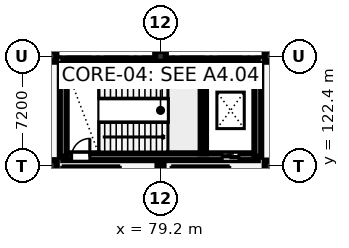
"""IFC4 building model, lengths in metres.
Left out: names, types, materials, properties, quantities, classifications, styles, units other than length and angle.
Written with IfcOpenShell. Run it as: python <this file> out.ifc"""

import sys

from ifc_helpers import new_model, si_unit, direction, frame, frame_2d, origin, origin_2d, place, context, subcontext, project, spatial, rectangle, hollow_rectangle, extrude, element, fill, save


model = new_model("IFC4")
c1 = context("Model", 3, precision=1e-05, world=origin(), true_north=direction((0.0, 1.0)))
c2 = subcontext(c1, "Body", "Model", "MODEL_VIEW")
j1 = project(units=[si_unit("LENGTHUNIT", "METRE"), si_unit("PLANEANGLEUNIT", "RADIAN")], contexts=[c1])
p1 = place(None, origin())
s1 = spatial("IfcSite", under=j1, at=p1, CompositionType="ELEMENT")
p2 = place(p1, origin())
s2 = spatial("IfcBuilding", under=s1, at=p2, CompositionType="ELEMENT")
p3 = place(p2, frame((0.0, 0.0, 9.6)))
s3 = spatial("IfcBuildingStorey", under=s2, at=p3, CompositionType="ELEMENT", Elevation=9.6)
p4 = place(p3, frame((72.0, 122.4, 0.0), z_axis=(0.0, 0.0, 1.0), x_axis=(1.0, 0.0, 0.0)))
e1 = element("IfcColumn", 1, at=p4, inside=s3, PredefinedType="COLUMN", context=c2, shape_type="SweptSolid", body=[
    extrude(rectangle(XDim=0.75, YDim=0.75, at=origin_2d()), origin(), (0.0, 0.0, 1.0), 4.2),
])
p5 = place(p3, frame((72.0, 129.6, 0.0), z_axis=(0.0, 0.0, 1.0), x_axis=(1.0, 0.0, 0.0)))
e2 = element("IfcColumn", 2, at=p5, inside=s3, PredefinedType="COLUMN", context=c2, shape_type="SweptSolid", body=[
    extrude(rectangle(XDim=0.7, YDim=0.7, at=origin_2d()), origin(), (0.0, 0.0, 1.0), 4.2),
])
p6 = place(p3, frame((79.2, 122.4, 0.0), z_axis=(0.0, 0.0, 1.0), x_axis=(1.0, 0.0, 0.0)))
e3 = element("IfcColumn", 3, at=p6, inside=s3, PredefinedType="COLUMN", context=c2, shape_type="SweptSolid", body=[
    extrude(hollow_rectangle(XDim=0.4, YDim=0.4, WallThickness=0.02, at=origin_2d()), origin(), (0.0, 0.0, 1.0), 4.2),
])
for number, where, z_axis, x_axis in (
    (4, (79.2, 129.6, 0.0), (0.0, 0.0, 1.0), (1.0, 0.0, 0.0)),
    (5, (86.4, 122.4, 0.0), (0.0, 0.0, 1.0), (1.0, 0.0, 0.0)),
    (6, (86.4, 129.6, 0.0), (0.0, 0.0, 1.0), (1.0, 0.0, 0.0)),
):
    element("IfcColumn", number, at=place(p3, frame(where, z_axis=z_axis, x_axis=x_axis)), inside=s3, PredefinedType="COLUMN", context=c2, shape_type="SweptSolid", body=[
        extrude(rectangle(XDim=0.7, YDim=0.7, at=origin_2d()), origin(), (0.0, 0.0, 1.0), 4.2),
    ])
p7 = place(p3, frame((72.8, 123.0, 0.0), z_axis=(0.0, 0.0, 1.0), x_axis=(1.0, 0.0, 0.0)))
e7 = element("IfcWall", 7, at=p7, inside=s3, PredefinedType="SHEAR", context=c2, shape_type="SweptSolid", body=[
    extrude(rectangle(XDim=12.8, YDim=0.45, at=frame_2d((6.4, 0.0))), origin(), (0.0, 0.0, 1.0), 3.88),
])
p8 = place(p7, frame((0.55, 0.0, 0.0)))
e8 = element("IfcOpeningElement", 8, at=p8, cuts=e7, PredefinedType="OPENING", context=c2, shape_type="SweptSolid", body=[
    extrude(rectangle(XDim=1.2, YDim=2.25, at=frame_2d((0.6, 1.125))), frame((0.0, 0.235, 0.0), z_axis=(0.0, -1.0, 0.0), x_axis=(1.0, 0.0, 0.0)), (0.0, 0.0, 1.0), 0.47),
])
p9 = place(p7, frame((10.458, 0.0, 0.0)))
e9 = element("IfcOpeningElement", 9, at=p9, cuts=e7, PredefinedType="OPENING", context=c2, shape_type="SweptSolid", body=[
    extrude(rectangle(XDim=1.1, YDim=2.2, at=frame_2d((0.55, 1.1))), frame((0.0, 0.235, 0.0), z_axis=(0.0, -1.0, 0.0), x_axis=(1.0, 0.0, 0.0)), (0.0, 0.0, 1.0), 0.47),
])
p10 = place(p3, frame((72.8, 129.1, 0.0), z_axis=(0.0, 0.0, 1.0), x_axis=(1.0, 0.0, 0.0)))
e10 = element("IfcWall", 10, at=p10, inside=s3, PredefinedType="SHEAR", context=c2, shape_type="SweptSolid", body=[
    extrude(rectangle(XDim=12.8, YDim=0.45, at=frame_2d((6.4, 0.0))), origin(), (0.0, 0.0, 1.0), 3.88),
])
for number, where, z_axis, x_axis in (
    (11, (72.8, 123.0, 0.0), (0.0, 0.0, 1.0), (0.0, 1.0, 0.0)),
    (12, (85.6, 123.0, 0.0), (0.0, 0.0, 1.0), (0.0, 1.0, 0.0)),
):
    element("IfcWall", number, at=place(p3, frame(where, z_axis=z_axis, x_axis=x_axis)), inside=s3, PredefinedType="SHEAR", context=c2, shape_type="SweptSolid", body=[
        extrude(rectangle(XDim=6.1, YDim=0.45, at=frame_2d((3.05, 0.0))), origin(), (0.0, 0.0, 1.0), 3.88),
    ])
p11 = place(p3, frame((82.016, 123.225, 0.0), z_axis=(0.0, 0.0, 1.0), x_axis=(0.0, 1.0, 0.0)))
e13 = element("IfcWall", 13, at=p11, inside=s3, PredefinedType="SHEAR", context=c2, shape_type="SweptSolid", body=[
    extrude(rectangle(XDim=5.65, YDim=0.35, at=frame_2d((2.825, 0.0))), origin(), (0.0, 0.0, 1.0), 3.88),
])
p12 = place(p3, frame((76.35, 122.2, 0.0), z_axis=(0.0, 0.0, 1.0), x_axis=(-1.0, 0.0, 0.0)))
e14 = element("IfcWall", 14, at=p12, inside=s3, PredefinedType="PARTITIONING", context=c2, shape_type="SweptSolid", body=[
    extrude(rectangle(XDim=3.45, YDim=0.2, at=frame_2d((1.725, 0.0))), origin(), (0.0, 0.0, 1.0), 2.94),
])
p13 = place(p3, frame((83.55, 122.2, 0.0), z_axis=(0.0, 0.0, 1.0), x_axis=(-1.0, 0.0, 0.0)))
e15 = element("IfcWall", 15, at=p13, inside=s3, PredefinedType="PARTITIONING", context=c2, shape_type="SweptSolid", body=[
    extrude(rectangle(XDim=3.45, YDim=0.2, at=frame_2d((1.725, 0.0))), origin(), (0.0, 0.0, 1.0), 2.94),
])
p14 = place(p8, origin())
e16 = element("IfcDoor", 16, at=p14, inside=s3, OperationType="SINGLE_SWING_RIGHT", PredefinedType="DOOR", context=c2, shape_type="SweptSolid", body=[
    extrude(rectangle(XDim=1.2, YDim=2.25, at=frame_2d((0.6, 1.125))), frame((0.0, 0.025, 0.0), z_axis=(0.0, -1.0, 0.0), x_axis=(1.0, 0.0, 0.0)), (0.0, 0.0, 1.0), 0.05),
])
fill(e8, e16)
p15 = place(p9, origin())
e17 = element("IfcDoor", 17, at=p15, inside=s3, OperationType="SLIDING_TO_RIGHT", PredefinedType="DOOR", context=c2, shape_type="SweptSolid", body=[
    extrude(rectangle(XDim=1.1, YDim=2.2, at=frame_2d((0.55, 1.1))), frame((0.0, 0.025, 0.0), z_axis=(0.0, -1.0, 0.0), x_axis=(1.0, 0.0, 0.0)), (0.0, 0.0, 1.0), 0.05),
])
fill(e9, e17)
save(model, sys.argv[1])
